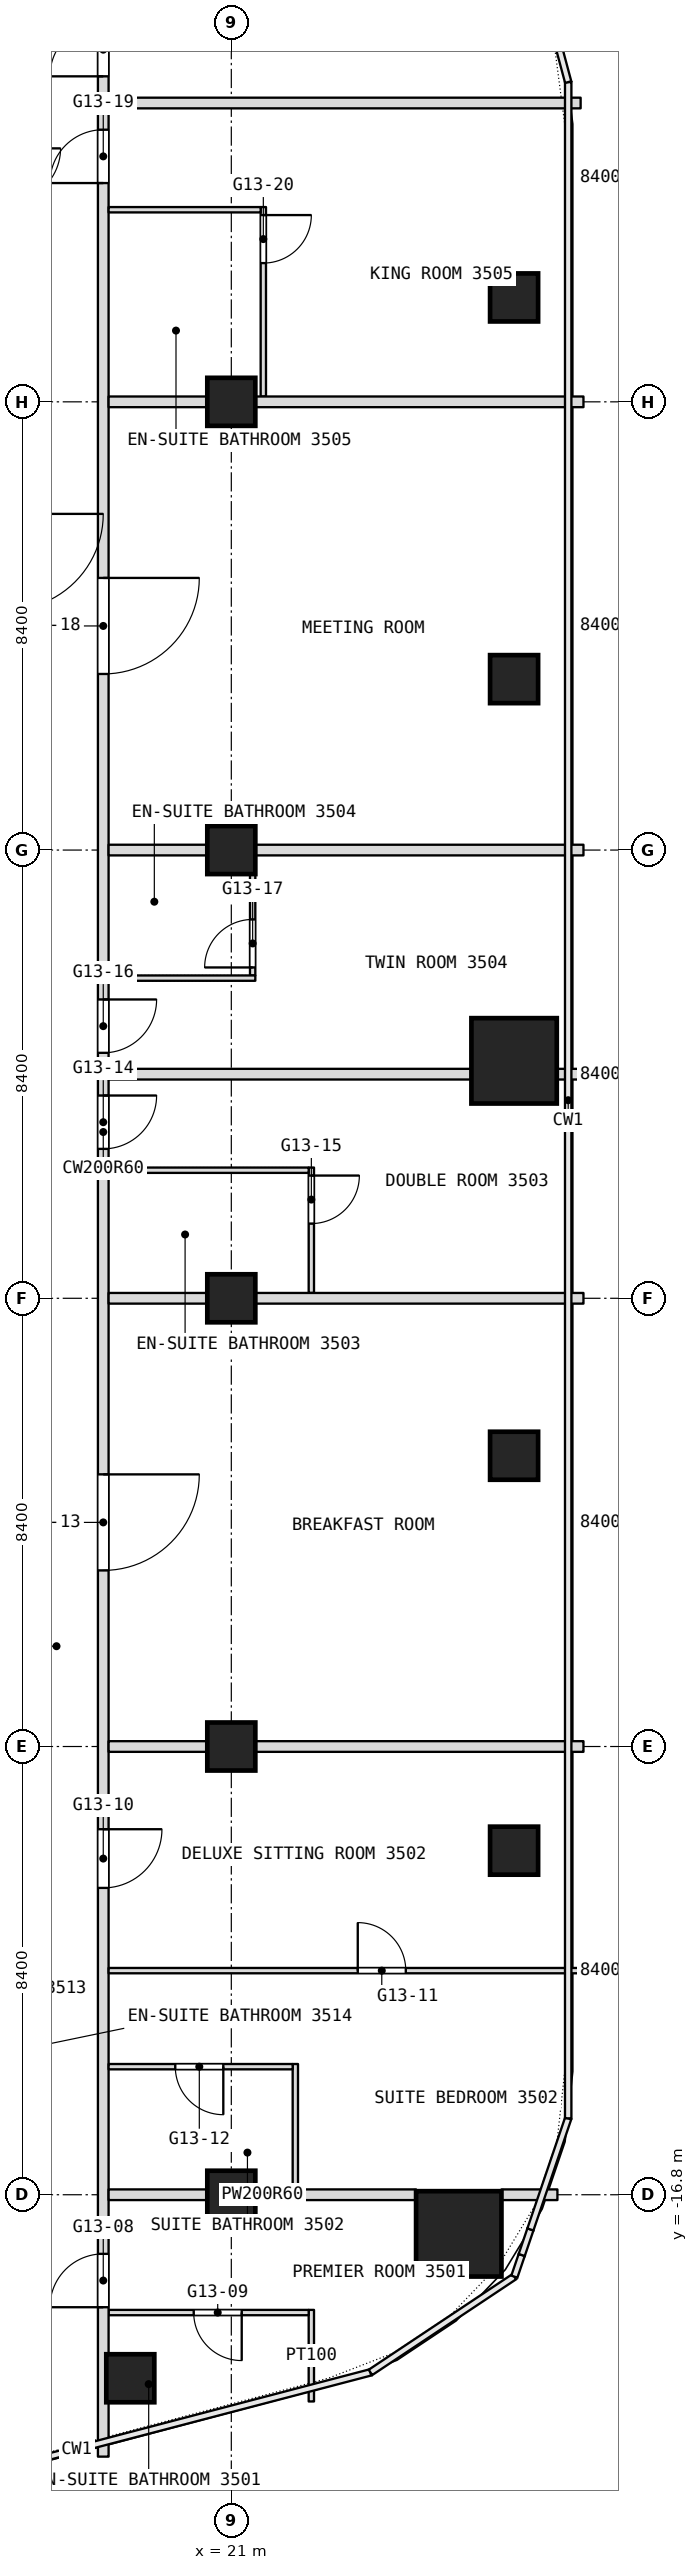
"""IFC4 building model, lengths in metres.
Left out: names, types, materials, properties, quantities, classifications, styles, units other than length and angle.
Written with IfcOpenShell. Run it as: python <this file> out.ifc"""

import sys

from ifc_helpers import new_model, si_unit, direction, frame, frame_2d, origin, origin_2d, place, context, subcontext, project, spatial, rectangle, extrude, element, fill, save


model = new_model("IFC4")
c1 = context("Model", 3, precision=1e-05, world=origin(), true_north=direction((0.0, 1.0)))
c2 = subcontext(c1, "Body", "Model", "MODEL_VIEW")
j1 = project(units=[si_unit("LENGTHUNIT", "METRE"), si_unit("PLANEANGLEUNIT", "RADIAN")], contexts=[c1])
p1 = place(None, origin())
s1 = spatial("IfcSite", under=j1, at=p1, CompositionType="ELEMENT")
p2 = place(p1, origin())
s2 = spatial("IfcBuilding", under=s1, at=p2, CompositionType="ELEMENT")
p3 = place(p2, frame((0.0, 0.0, 151.7)))
s3 = spatial("IfcBuildingStorey", under=s2, at=p3, CompositionType="ELEMENT", Elevation=151.7)
for number, where, z_axis, x_axis in (
    (1, (25.263, -17.533, 0.0), (0.0, 0.0, 1.0), (1.0, 0.0, 0.0)),
    (2, (26.3, 4.45, 0.0), (0.0, 0.0, 1.0), (1.0, 0.0, 0.0)),
):
    element("IfcColumn", number, at=place(p3, frame(where, z_axis=z_axis, x_axis=x_axis)), inside=s3, PredefinedType="COLUMN", context=c2, shape_type="SweptSolid", body=[
        extrude(rectangle(XDim=1.6, YDim=1.6, at=origin_2d()), origin(), (0.0, 0.0, 1.0), 3.6),
    ])
for number, where, z_axis, x_axis in (
    (3, (21.0, -16.8, 0.0), (0.0, 0.0, 1.0), (1.0, 0.0, 0.0)),
    (4, (21.0, -8.4, 0.0), (0.0, 0.0, 1.0), (1.0, 0.0, 0.0)),
    (5, (21.0, 0.0, 0.0), (0.0, 0.0, 1.0), (1.0, 0.0, 0.0)),
    (6, (21.0, 8.4, 0.0), (0.0, 0.0, 1.0), (1.0, 0.0, 0.0)),
    (7, (21.0, 16.8, 0.0), (0.0, 0.0, 1.0), (1.0, 0.0, 0.0)),
    (8, (26.3, 18.756, 0.0), (0.0, 0.0, 1.0), (1.0, 0.0, 0.0)),
    (9, (26.3, 11.603, 0.0), (0.0, 0.0, 1.0), (1.0, 0.0, 0.0)),
    (10, (26.3, -2.951, 0.0), (0.0, 0.0, 1.0), (1.0, 0.0, 0.0)),
    (11, (26.3, -10.352, 0.0), (0.0, 0.0, 1.0), (1.0, 0.0, 0.0)),
    (12, (19.107, -20.239, 0.0), (0.0, 0.0, 1.0), (1.0, 0.0, 0.0)),
):
    element("IfcColumn", number, at=place(p3, frame(where, z_axis=z_axis, x_axis=x_axis)), inside=s3, PredefinedType="COLUMN", context=c2, shape_type="SweptSolid", body=[
        extrude(rectangle(XDim=0.9, YDim=0.9, at=origin_2d()), origin(), (0.0, 0.0, 1.0), 3.6),
    ])
p4 = place(p3, frame((22.5, -20.674, 0.0), z_axis=(0.0, 0.0, 1.0), x_axis=(0.0, 1.0, 0.0)))
e13 = element("IfcWall", 13, at=p4, inside=s3, PredefinedType="PARTITIONING", context=c2, shape_type="SweptSolid", body=[
    extrude(rectangle(XDim=1.716, YDim=0.1, at=frame_2d((0.858, 0.0))), origin(), (0.0, 0.0, 1.0), 3.34),
])
p5 = place(p3, frame((22.5, 0.1, 0.0), z_axis=(0.0, 0.0, 1.0), x_axis=(0.0, 1.0, 0.0)))
e14 = element("IfcWall", 14, at=p5, inside=s3, PredefinedType="PARTITIONING", context=c2, shape_type="SweptSolid", body=[
    extrude(rectangle(XDim=2.35, YDim=0.1, at=frame_2d((1.175, 0.0))), origin(), (0.0, 0.0, 1.0), 3.34),
])
p6 = place(p5, frame((1.3, 0.0, 0.0)))
e15 = element("IfcOpeningElement", 15, at=p6, cuts=e14, PredefinedType="OPENING", context=c2, shape_type="SweptSolid", body=[
    extrude(rectangle(XDim=0.9, YDim=2.1, at=frame_2d((0.45, 1.05))), frame((0.0, 0.05, 0.0), z_axis=(0.0, -1.0, 0.0), x_axis=(1.0, 0.0, 0.0)), (0.0, 0.0, 1.0), 0.1),
])
p7 = place(p3, frame((22.2, -16.7, 0.0), z_axis=(0.0, 0.0, 1.0), x_axis=(0.0, 1.0, 0.0)))
e16 = element("IfcWall", 16, at=p7, inside=s3, PredefinedType="PARTITIONING", context=c2, shape_type="SweptSolid", body=[
    extrude(rectangle(XDim=2.35, YDim=0.1, at=frame_2d((1.175, 0.0))), origin(), (0.0, 0.0, 1.0), 3.34),
])
p8 = place(p3, frame((21.6, 16.9, 0.0), z_axis=(0.0, 0.0, 1.0), x_axis=(0.0, 1.0, 0.0)))
e17 = element("IfcWall", 17, at=p8, inside=s3, PredefinedType="PARTITIONING", context=c2, shape_type="SweptSolid", body=[
    extrude(rectangle(XDim=3.55, YDim=0.1, at=frame_2d((1.775, 0.0))), origin(), (0.0, 0.0, 1.0), 3.34),
])
p9 = place(p8, frame((2.5, 0.0, 0.0)))
e18 = element("IfcOpeningElement", 18, at=p9, cuts=e17, PredefinedType="OPENING", context=c2, shape_type="SweptSolid", body=[
    extrude(rectangle(XDim=0.9, YDim=2.1, at=frame_2d((0.45, 1.05))), frame((0.0, 0.05, 0.0), z_axis=(0.0, -1.0, 0.0), x_axis=(1.0, 0.0, 0.0)), (0.0, 0.0, 1.0), 0.1),
])
p10 = place(p3, frame((21.4, 6.05, 0.0), z_axis=(0.0, 0.0, 1.0), x_axis=(0.0, 1.0, 0.0)))
e19 = element("IfcWall", 19, at=p10, inside=s3, PredefinedType="PARTITIONING", context=c2, shape_type="SweptSolid", body=[
    extrude(rectangle(XDim=2.45, YDim=0.1, at=frame_2d((1.225, 0.0))), origin(), (0.0, 0.0, 1.0), 3.34),
])
p11 = place(p10, frame((0.15, 0.0, 0.0)))
e20 = element("IfcOpeningElement", 20, at=p11, cuts=e19, PredefinedType="OPENING", context=c2, shape_type="SweptSolid", body=[
    extrude(rectangle(XDim=0.9, YDim=2.1, at=frame_2d((0.45, 1.05))), frame((0.0, 0.05, 0.0), z_axis=(0.0, -1.0, 0.0), x_axis=(1.0, 0.0, 0.0)), (0.0, 0.0, 1.0), 0.1),
])
p12 = place(p3, frame((18.7, -19.008, 0.0), z_axis=(0.0, 0.0, 1.0), x_axis=(1.0, 0.0, 0.0)))
e21 = element("IfcWall", 21, at=p12, inside=s3, PredefinedType="PARTITIONING", context=c2, shape_type="SweptSolid", body=[
    extrude(rectangle(XDim=3.75, YDim=0.1, at=frame_2d((1.875, 0.0))), origin(), (0.0, 0.0, 1.0), 3.34),
])
p13 = place(p12, frame((1.595, 0.0, 0.0)))
e22 = element("IfcOpeningElement", 22, at=p13, cuts=e21, PredefinedType="OPENING", context=c2, shape_type="SweptSolid", body=[
    extrude(rectangle(XDim=0.9, YDim=2.1, at=frame_2d((0.45, 1.05))), frame((0.0, 0.05, 0.0), z_axis=(0.0, -1.0, 0.0), x_axis=(1.0, 0.0, 0.0)), (0.0, 0.0, 1.0), 0.1),
])
p14 = place(p3, frame((18.6, -21.708, 0.0), z_axis=(0.0, 0.0, 1.0), x_axis=(0.0, 1.0, 0.0)))
e23 = element("IfcWall", 23, at=p14, inside=s3, PredefinedType="PARTITIONING", context=c2, shape_type="SweptSolid", body=[
    extrude(rectangle(XDim=49.648, YDim=0.2, at=frame_2d((24.824, 0.0))), origin(), (0.0, 0.0, 1.0), 3.34),
])
p15 = place(p14, frame((2.8, 0.0, 0.0)))
e24 = element("IfcOpeningElement", 24, at=p15, cuts=e23, PredefinedType="OPENING", context=c2, shape_type="SweptSolid", body=[
    extrude(rectangle(XDim=1.0, YDim=2.1, at=frame_2d((0.5, 1.05))), frame((0.0, 0.1, 0.0), z_axis=(0.0, -1.0, 0.0), x_axis=(1.0, 0.0, 0.0)), (0.0, 0.0, 1.0), 0.2),
])
p16 = place(p14, frame((10.658, 0.0, 0.0)))
e25 = element("IfcOpeningElement", 25, at=p16, cuts=e23, PredefinedType="OPENING", context=c2, shape_type="SweptSolid", body=[
    extrude(rectangle(XDim=1.1, YDim=2.1, at=frame_2d((0.55, 1.05))), frame((0.0, 0.1, 0.0), z_axis=(0.0, -1.0, 0.0), x_axis=(1.0, 0.0, 0.0)), (0.0, 0.0, 1.0), 0.2),
])
p17 = place(p14, frame((16.608, 0.0, 0.0)))
e26 = element("IfcOpeningElement", 26, at=p17, cuts=e23, PredefinedType="OPENING", context=c2, shape_type="SweptSolid", body=[
    extrude(rectangle(XDim=1.8, YDim=2.1, at=frame_2d((0.9, 1.05))), frame((0.0, 0.1, 0.0), z_axis=(0.0, -1.0, 0.0), x_axis=(1.0, 0.0, 0.0)), (0.0, 0.0, 1.0), 0.2),
])
p18 = place(p14, frame((24.508, 0.0, 0.0)))
e27 = element("IfcOpeningElement", 27, at=p18, cuts=e23, PredefinedType="OPENING", context=c2, shape_type="SweptSolid", body=[
    extrude(rectangle(XDim=1.0, YDim=2.1, at=frame_2d((0.5, 1.05))), frame((0.0, 0.1, 0.0), z_axis=(0.0, -1.0, 0.0), x_axis=(1.0, 0.0, 0.0)), (0.0, 0.0, 1.0), 0.2),
])
p19 = place(p14, frame((26.308, 0.0, 0.0)))
e28 = element("IfcOpeningElement", 28, at=p19, cuts=e23, PredefinedType="OPENING", context=c2, shape_type="SweptSolid", body=[
    extrude(rectangle(XDim=1.0, YDim=2.1, at=frame_2d((0.5, 1.05))), frame((0.0, 0.1, 0.0), z_axis=(0.0, -1.0, 0.0), x_axis=(1.0, 0.0, 0.0)), (0.0, 0.0, 1.0), 0.2),
])
p20 = place(p14, frame((33.408, 0.0, 0.0)))
e29 = element("IfcOpeningElement", 29, at=p20, cuts=e23, PredefinedType="OPENING", context=c2, shape_type="SweptSolid", body=[
    extrude(rectangle(XDim=1.8, YDim=2.1, at=frame_2d((0.9, 1.05))), frame((0.0, 0.1, 0.0), z_axis=(0.0, -1.0, 0.0), x_axis=(1.0, 0.0, 0.0)), (0.0, 0.0, 1.0), 0.2),
])
p21 = place(p14, frame((42.608, 0.0, 0.0)))
e30 = element("IfcOpeningElement", 30, at=p21, cuts=e23, PredefinedType="OPENING", context=c2, shape_type="SweptSolid", body=[
    extrude(rectangle(XDim=1.0, YDim=2.1, at=frame_2d((0.5, 1.05))), frame((0.0, 0.1, 0.0), z_axis=(0.0, -1.0, 0.0), x_axis=(1.0, 0.0, 0.0)), (0.0, 0.0, 1.0), 0.2),
])
p22 = place(p14, frame((44.608, 0.0, 0.0)))
e31 = element("IfcOpeningElement", 31, at=p22, cuts=e23, PredefinedType="OPENING", context=c2, shape_type="SweptSolid", body=[
    extrude(rectangle(XDim=1.0, YDim=2.1, at=frame_2d((0.5, 1.05))), frame((0.0, 0.1, 0.0), z_axis=(0.0, -1.0, 0.0), x_axis=(1.0, 0.0, 0.0)), (0.0, 0.0, 1.0), 0.2),
])
p23 = place(p3, frame((18.7, -16.8, 0.0), z_axis=(0.0, 0.0, 1.0), x_axis=(1.0, 0.0, 0.0)))
e32 = element("IfcWall", 32, at=p23, inside=s3, PredefinedType="PARTITIONING", context=c2, shape_type="SweptSolid", body=[
    extrude(rectangle(XDim=5.763, YDim=0.2, at=frame_2d((2.881, 0.0))), origin(), (0.0, 0.0, 1.0), 2.89),
])
p24 = place(p3, frame((26.063, -16.8, 0.0), z_axis=(0.0, 0.0, 1.0), x_axis=(1.0, 0.0, 0.0)))
e33 = element("IfcWall", 33, at=p24, inside=s3, PredefinedType="PARTITIONING", context=c2, shape_type="SweptSolid", body=[
    extrude(rectangle(XDim=1.049, YDim=0.2, at=frame_2d((0.524, 0.0))), origin(), (0.0, 0.0, 1.0), 3.34),
])
p25 = place(p3, frame((18.7, -14.4, 0.0), z_axis=(0.0, 0.0, 1.0), x_axis=(1.0, 0.0, 0.0)))
e34 = element("IfcWall", 34, at=p25, inside=s3, PredefinedType="PARTITIONING", context=c2, shape_type="SweptSolid", body=[
    extrude(rectangle(XDim=3.45, YDim=0.1, at=frame_2d((1.725, 0.0))), origin(), (0.0, 0.0, 1.0), 3.34),
])
p26 = place(p25, frame((1.25, 0.0, 0.0)))
e35 = element("IfcOpeningElement", 35, at=p26, cuts=e34, PredefinedType="OPENING", context=c2, shape_type="SweptSolid", body=[
    extrude(rectangle(XDim=0.9, YDim=2.1, at=frame_2d((0.45, 1.05))), frame((0.0, 0.05, 0.0), z_axis=(0.0, -1.0, 0.0), x_axis=(1.0, 0.0, 0.0)), (0.0, 0.0, 1.0), 0.1),
])
p27 = place(p3, frame((18.7, -12.6, 0.0), z_axis=(0.0, 0.0, 1.0), x_axis=(1.0, 0.0, 0.0)))
e36 = element("IfcWall", 36, at=p27, inside=s3, PredefinedType="PARTITIONING", context=c2, shape_type="SweptSolid", body=[
    extrude(rectangle(XDim=8.9, YDim=0.1, at=frame_2d((4.45, 0.0))), origin(), (0.0, 0.0, 1.0), 3.34),
])
p28 = place(p27, frame((4.67, 0.0, 0.0)))
e37 = element("IfcOpeningElement", 37, at=p28, cuts=e36, PredefinedType="OPENING", context=c2, shape_type="SweptSolid", body=[
    extrude(rectangle(XDim=0.9, YDim=2.1, at=frame_2d((0.45, 1.05))), frame((0.0, 0.05, 0.0), z_axis=(0.0, -1.0, 0.0), x_axis=(1.0, 0.0, 0.0)), (0.0, 0.0, 1.0), 0.1),
])
for number, where, z_axis, x_axis in (
    (38, (18.7, -8.4, 0.0), (0.0, 0.0, 1.0), (1.0, 0.0, 0.0)),
    (39, (18.7, 0.0, 0.0), (0.0, 0.0, 1.0), (1.0, 0.0, 0.0)),
):
    element("IfcWall", number, at=place(p3, frame(where, z_axis=z_axis, x_axis=x_axis)), inside=s3, PredefinedType="PARTITIONING", context=c2, shape_type="SweptSolid", body=[
        extrude(rectangle(XDim=8.9, YDim=0.2, at=frame_2d((4.45, 0.0))), origin(), (0.0, 0.0, 1.0), 2.89),
    ])
p29 = place(p3, frame((18.7, 2.4, 0.0), z_axis=(0.0, 0.0, 1.0), x_axis=(1.0, 0.0, 0.0)))
e40 = element("IfcWall", 40, at=p29, inside=s3, PredefinedType="PARTITIONING", context=c2, shape_type="SweptSolid", body=[
    extrude(rectangle(XDim=3.75, YDim=0.1, at=frame_2d((1.875, 0.0))), origin(), (0.0, 0.0, 1.0), 3.34),
])
p30 = place(p3, frame((18.7, 4.2, 0.0), z_axis=(0.0, 0.0, 1.0), x_axis=(1.0, 0.0, 0.0)))
e41 = element("IfcWall", 41, at=p30, inside=s3, PredefinedType="PARTITIONING", context=c2, shape_type="SweptSolid", body=[
    extrude(rectangle(XDim=6.8, YDim=0.2, at=frame_2d((3.4, 0.0))), origin(), (0.0, 0.0, 1.0), 3.34),
])
p31 = place(p3, frame((27.1, 4.2, 0.0), z_axis=(0.0, 0.0, 1.0), x_axis=(1.0, 0.0, 0.0)))
e42 = element("IfcWall", 42, at=p31, inside=s3, PredefinedType="PARTITIONING", context=c2, shape_type="SweptSolid", body=[
    extrude(rectangle(XDim=0.5, YDim=0.2, at=frame_2d((0.25, 0.0))), origin(), (0.0, 0.0, 1.0), 3.34),
])
p32 = place(p3, frame((18.7, 6.0, 0.0), z_axis=(0.0, 0.0, 1.0), x_axis=(1.0, 0.0, 0.0)))
e43 = element("IfcWall", 43, at=p32, inside=s3, PredefinedType="PARTITIONING", context=c2, shape_type="SweptSolid", body=[
    extrude(rectangle(XDim=2.75, YDim=0.1, at=frame_2d((1.375, 0.0))), origin(), (0.0, 0.0, 1.0), 3.34),
])
for number, where, z_axis, x_axis in (
    (44, (18.7, 8.4, 0.0), (0.0, 0.0, 1.0), (1.0, 0.0, 0.0)),
    (45, (18.7, 16.8, 0.0), (0.0, 0.0, 1.0), (1.0, 0.0, 0.0)),
):
    element("IfcWall", number, at=place(p3, frame(where, z_axis=z_axis, x_axis=x_axis)), inside=s3, PredefinedType="PARTITIONING", context=c2, shape_type="SweptSolid", body=[
        extrude(rectangle(XDim=8.9, YDim=0.2, at=frame_2d((4.45, 0.0))), origin(), (0.0, 0.0, 1.0), 2.89),
    ])
p33 = place(p3, frame((18.7, 20.4, 0.0), z_axis=(0.0, 0.0, 1.0), x_axis=(1.0, 0.0, 0.0)))
e46 = element("IfcWall", 46, at=p33, inside=s3, PredefinedType="PARTITIONING", context=c2, shape_type="SweptSolid", body=[
    extrude(rectangle(XDim=2.85, YDim=0.1, at=frame_2d((1.425, 0.0))), origin(), (0.0, 0.0, 1.0), 3.34),
])
p34 = place(p3, frame((18.7, 22.4, 0.0), z_axis=(0.0, 0.0, 1.0), x_axis=(1.0, 0.0, 0.0)))
e47 = element("IfcWall", 47, at=p34, inside=s3, PredefinedType="PARTITIONING", context=c2, shape_type="SweptSolid", body=[
    extrude(rectangle(XDim=8.847, YDim=0.2, at=frame_2d((4.424, 0.0))), origin(), (0.0, 0.0, 1.0), 3.34),
])
p35 = place(p6, origin())
e48 = element("IfcDoor", 48, at=p35, inside=s3, OperationType="SINGLE_SWING_RIGHT", PredefinedType="DOOR", context=c2, shape_type="SweptSolid", body=[
    extrude(rectangle(XDim=0.9, YDim=2.1, at=frame_2d((0.45, 1.05))), frame((0.0, 0.025, 0.0), z_axis=(0.0, -1.0, 0.0), x_axis=(1.0, 0.0, 0.0)), (0.0, 0.0, 1.0), 0.05),
])
fill(e15, e48)
p36 = place(p9, origin())
e49 = element("IfcDoor", 49, at=p36, inside=s3, OperationType="SINGLE_SWING_RIGHT", PredefinedType="DOOR", context=c2, shape_type="SweptSolid", body=[
    extrude(rectangle(XDim=0.9, YDim=2.1, at=frame_2d((0.45, 1.05))), frame((0.0, 0.025, 0.0), z_axis=(0.0, -1.0, 0.0), x_axis=(1.0, 0.0, 0.0)), (0.0, 0.0, 1.0), 0.05),
])
fill(e18, e49)
p37 = place(p11, origin())
e50 = element("IfcDoor", 50, at=p37, inside=s3, OperationType="SINGLE_SWING_LEFT", PredefinedType="DOOR", context=c2, shape_type="SweptSolid", body=[
    extrude(rectangle(XDim=0.9, YDim=2.1, at=frame_2d((0.45, 1.05))), frame((0.0, 0.025, 0.0), z_axis=(0.0, -1.0, 0.0), x_axis=(1.0, 0.0, 0.0)), (0.0, 0.0, 1.0), 0.05),
])
fill(e20, e50)
p38 = place(p13, origin())
e51 = element("IfcDoor", 51, at=p38, inside=s3, OperationType="SINGLE_SWING_RIGHT", PredefinedType="DOOR", context=c2, shape_type="SweptSolid", body=[
    extrude(rectangle(XDim=0.9, YDim=2.1, at=frame_2d((0.45, 1.05))), frame((0.0, 0.025, 0.0), z_axis=(0.0, -1.0, 0.0), x_axis=(1.0, 0.0, 0.0)), (0.0, 0.0, 1.0), 0.05),
])
fill(e22, e51)
p39 = place(p15, origin())
e52 = element("IfcDoor", 52, at=p39, inside=s3, OperationType="SINGLE_SWING_RIGHT", PredefinedType="DOOR", context=c2, shape_type="SweptSolid", body=[
    extrude(rectangle(XDim=1.0, YDim=2.1, at=frame_2d((0.5, 1.05))), frame((0.0, 0.025, 0.0), z_axis=(0.0, -1.0, 0.0), x_axis=(1.0, 0.0, 0.0)), (0.0, 0.0, 1.0), 0.05),
])
fill(e24, e52)
p40 = place(p16, origin())
e53 = element("IfcDoor", 53, at=p40, inside=s3, OperationType="SINGLE_SWING_RIGHT", PredefinedType="DOOR", context=c2, shape_type="SweptSolid", body=[
    extrude(rectangle(XDim=1.1, YDim=2.1, at=frame_2d((0.55, 1.05))), frame((0.0, 0.025, 0.0), z_axis=(0.0, -1.0, 0.0), x_axis=(1.0, 0.0, 0.0)), (0.0, 0.0, 1.0), 0.05),
])
fill(e25, e53)
p41 = place(p17, origin())
e54 = element("IfcDoor", 54, at=p41, inside=s3, OperationType="DOUBLE_DOOR_SINGLE_SWING", PredefinedType="DOOR", context=c2, shape_type="SweptSolid", body=[
    extrude(rectangle(XDim=1.8, YDim=2.1, at=frame_2d((0.9, 1.05))), frame((0.0, 0.025, 0.0), z_axis=(0.0, -1.0, 0.0), x_axis=(1.0, 0.0, 0.0)), (0.0, 0.0, 1.0), 0.05),
])
fill(e26, e54)
p42 = place(p18, origin())
e55 = element("IfcDoor", 55, at=p42, inside=s3, OperationType="SINGLE_SWING_RIGHT", PredefinedType="DOOR", context=c2, shape_type="SweptSolid", body=[
    extrude(rectangle(XDim=1.0, YDim=2.1, at=frame_2d((0.5, 1.05))), frame((0.0, 0.025, 0.0), z_axis=(0.0, -1.0, 0.0), x_axis=(1.0, 0.0, 0.0)), (0.0, 0.0, 1.0), 0.05),
])
fill(e27, e55)
p43 = place(p19, origin())
e56 = element("IfcDoor", 56, at=p43, inside=s3, OperationType="SINGLE_SWING_RIGHT", PredefinedType="DOOR", context=c2, shape_type="SweptSolid", body=[
    extrude(rectangle(XDim=1.0, YDim=2.1, at=frame_2d((0.5, 1.05))), frame((0.0, 0.025, 0.0), z_axis=(0.0, -1.0, 0.0), x_axis=(1.0, 0.0, 0.0)), (0.0, 0.0, 1.0), 0.05),
])
fill(e28, e56)
p44 = place(p20, origin())
e57 = element("IfcDoor", 57, at=p44, inside=s3, OperationType="DOUBLE_DOOR_SINGLE_SWING", PredefinedType="DOOR", context=c2, shape_type="SweptSolid", body=[
    extrude(rectangle(XDim=1.8, YDim=2.1, at=frame_2d((0.9, 1.05))), frame((0.0, 0.025, 0.0), z_axis=(0.0, -1.0, 0.0), x_axis=(1.0, 0.0, 0.0)), (0.0, 0.0, 1.0), 0.05),
])
fill(e29, e57)
p45 = place(p21, origin())
e58 = element("IfcDoor", 58, at=p45, inside=s3, OperationType="SINGLE_SWING_LEFT", PredefinedType="DOOR", context=c2, shape_type="SweptSolid", body=[
    extrude(rectangle(XDim=1.0, YDim=2.1, at=frame_2d((0.5, 1.05))), frame((0.0, 0.025, 0.0), z_axis=(0.0, -1.0, 0.0), x_axis=(1.0, 0.0, 0.0)), (0.0, 0.0, 1.0), 0.05),
])
fill(e30, e58)
p46 = place(p22, origin())
e59 = element("IfcDoor", 59, at=p46, inside=s3, OperationType="SINGLE_SWING_LEFT", PredefinedType="DOOR", context=c2, shape_type="SweptSolid", body=[
    extrude(rectangle(XDim=1.0, YDim=2.1, at=frame_2d((0.5, 1.05))), frame((0.0, 0.025, 0.0), z_axis=(0.0, -1.0, 0.0), x_axis=(1.0, 0.0, 0.0)), (0.0, 0.0, 1.0), 0.05),
])
fill(e31, e59)
p47 = place(p26, origin())
e60 = element("IfcDoor", 60, at=p47, inside=s3, OperationType="SINGLE_SWING_RIGHT", PredefinedType="DOOR", context=c2, shape_type="SweptSolid", body=[
    extrude(rectangle(XDim=0.9, YDim=2.1, at=frame_2d((0.45, 1.05))), frame((0.0, 0.025, 0.0), z_axis=(0.0, -1.0, 0.0), x_axis=(1.0, 0.0, 0.0)), (0.0, 0.0, 1.0), 0.05),
])
fill(e35, e60)
p48 = place(p28, origin())
e61 = element("IfcDoor", 61, at=p48, inside=s3, OperationType="SINGLE_SWING_RIGHT", PredefinedType="DOOR", context=c2, shape_type="SweptSolid", body=[
    extrude(rectangle(XDim=0.9, YDim=2.1, at=frame_2d((0.45, 1.05))), frame((0.0, 0.025, 0.0), z_axis=(0.0, -1.0, 0.0), x_axis=(1.0, 0.0, 0.0)), (0.0, 0.0, 1.0), 0.05),
])
fill(e37, e61)
save(model, sys.argv[1])
